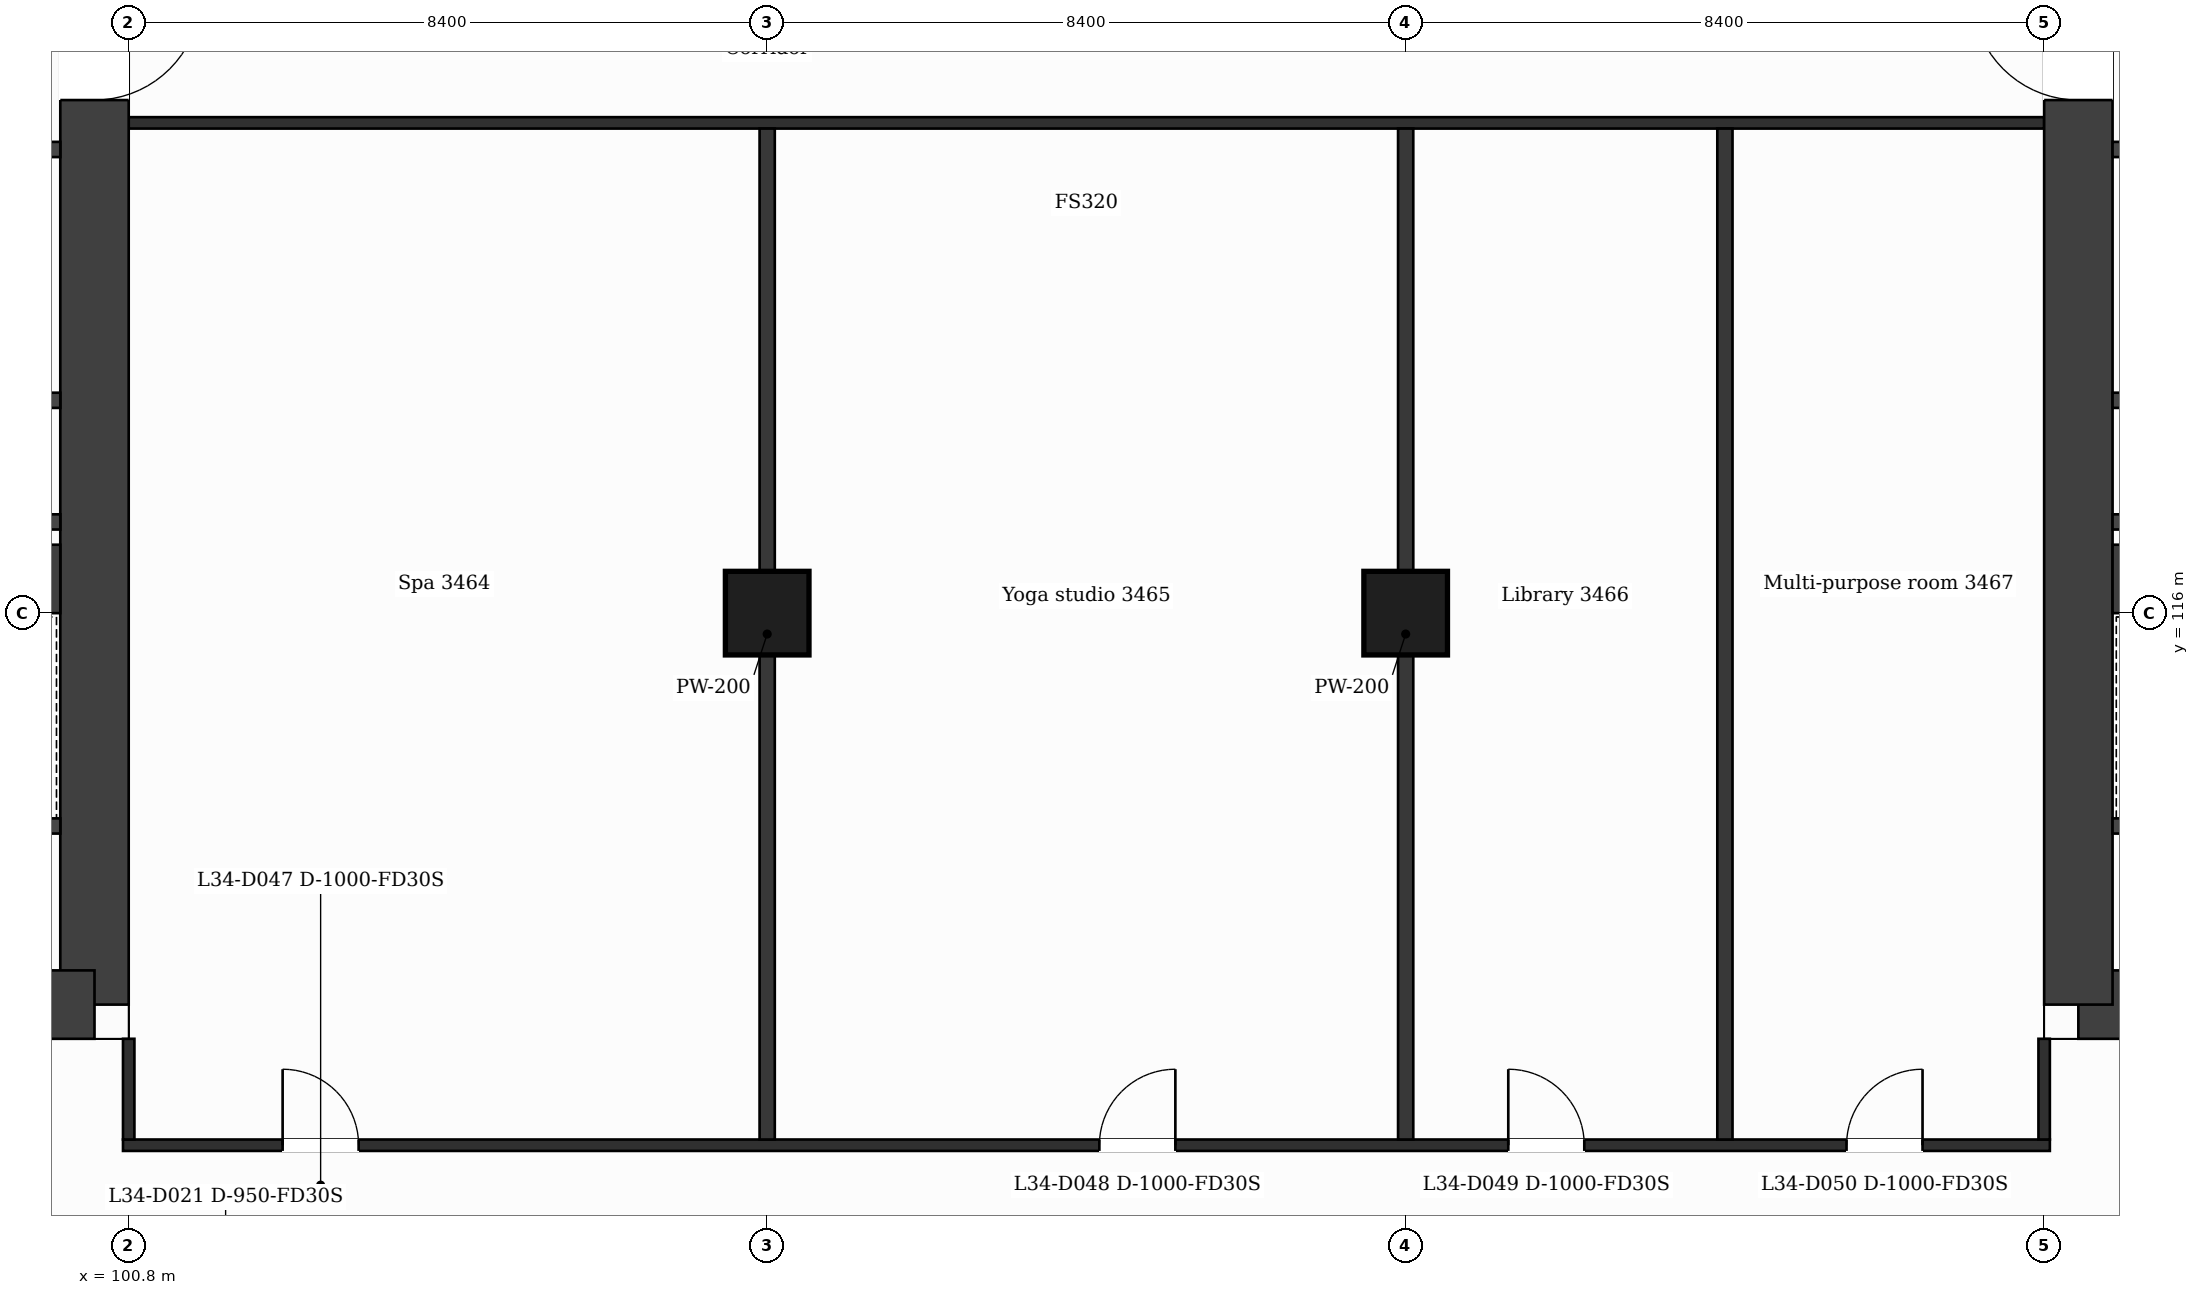
"""IFC4 building model, lengths in metres.
Left out: names, types, materials, properties, quantities, classifications, styles, units other than length and angle.
Written with IfcOpenShell. Run it as: python <this file> out.ifc"""

import sys

from ifc_helpers import new_model, si_unit, direction, frame, frame_2d, origin, origin_2d, place, context, subcontext, project, spatial, rectangle, extrude, element, fill, save


model = new_model("IFC4")
c1 = context("Model", 3, precision=1e-05, world=origin(), true_north=direction((0.0, 1.0)))
c2 = subcontext(c1, "Body", "Model", "MODEL_VIEW")
j1 = project(units=[si_unit("LENGTHUNIT", "METRE"), si_unit("PLANEANGLEUNIT", "RADIAN")], contexts=[c1])
p1 = place(None, origin())
s1 = spatial("IfcSite", under=j1, at=p1, CompositionType="ELEMENT")
p2 = place(p1, origin())
s2 = spatial("IfcBuilding", under=s1, at=p2, CompositionType="ELEMENT")
p3 = place(p2, frame((0.0, 0.0, 147.8)))
s3 = spatial("IfcBuildingStorey", under=s2, at=p3, CompositionType="ELEMENT", Elevation=147.8)
p4 = place(p3, frame((100.35, 131.95, 0.0), z_axis=(0.0, 0.0, 1.0), x_axis=(0.0, -1.0, 0.0)))
e1 = element("IfcWall", 1, at=p4, inside=s3, PredefinedType="SHEAR", context=c2, shape_type="SweptSolid", body=[
    extrude(rectangle(XDim=21.1, YDim=0.9, at=frame_2d((10.55, 0.0))), origin(), (0.0, 0.0, 1.0), 3.7),
])
p5 = place(p4, frame((7.8, 0.0, 0.0)))
e2 = element("IfcOpeningElement", 2, at=p5, cuts=e1, PredefinedType="OPENING", context=c2, shape_type="SweptSolid", body=[
    extrude(rectangle(XDim=1.4, YDim=2.1, at=frame_2d((0.7, 1.05))), frame((0.0, 0.46, 0.0), z_axis=(0.0, -1.0, 0.0), x_axis=(1.0, 0.0, 0.0)), (0.0, 0.0, 1.0), 0.92),
])
p6 = place(p3, frame((100.35, 110.85, 0.0), z_axis=(0.0, 0.0, 1.0), x_axis=(-1.0, 0.0, 0.0)))
e3 = element("IfcWall", 3, at=p6, inside=s3, PredefinedType="SHEAR", context=c2, shape_type="SweptSolid", body=[
    extrude(rectangle(XDim=14.166, YDim=0.9, at=frame_2d((7.083, 0.0))), origin(), (0.0, 0.0, 1.0), 3.7),
])
p7 = place(p6, frame((5.855, 0.0, 0.0)))
e4 = element("IfcOpeningElement", 4, at=p7, cuts=e3, PredefinedType="OPENING", context=c2, shape_type="SweptSolid", body=[
    extrude(rectangle(XDim=1.4, YDim=2.1, at=frame_2d((0.7, 1.05))), frame((0.0, 0.46, 0.0), z_axis=(0.0, -1.0, 0.0), x_axis=(1.0, 0.0, 0.0)), (0.0, 0.0, 1.0), 0.92),
])
p8 = place(p3, frame((94.8, 116.45, 0.0), z_axis=(0.0, 0.0, 1.0), x_axis=(1.0, 0.0, 0.0)))
e5 = element("IfcWall", 5, at=p8, inside=s3, PredefinedType="SHEAR", context=c2, shape_type="SweptSolid", body=[
    extrude(rectangle(XDim=5.1, YDim=0.9, at=frame_2d((2.55, 0.0))), origin(), (0.0, 0.0, 1.0), 3.7),
])
p9 = place(p3, frame((140.616, 110.85, 0.0), z_axis=(0.0, 0.0, 1.0), x_axis=(-1.0, 0.0, 0.0)))
e6 = element("IfcWall", 6, at=p9, inside=s3, PredefinedType="SHEAR", context=c2, shape_type="SweptSolid", body=[
    extrude(rectangle(XDim=14.166, YDim=0.9, at=frame_2d((7.083, 0.0))), origin(), (0.0, 0.0, 1.0), 3.7),
])
p10 = place(p9, frame((6.911, 0.0, 0.0)))
e7 = element("IfcOpeningElement", 7, at=p10, cuts=e6, PredefinedType="OPENING", context=c2, shape_type="SweptSolid", body=[
    extrude(rectangle(XDim=1.4, YDim=2.1, at=frame_2d((0.7, 1.05))), frame((0.0, 0.46, 0.0), z_axis=(0.0, -1.0, 0.0), x_axis=(1.0, 0.0, 0.0)), (0.0, 0.0, 1.0), 0.92),
])
p11 = place(p3, frame((126.45, 110.85, 0.0), z_axis=(0.0, 0.0, 1.0), x_axis=(0.0, 1.0, 0.0)))
e8 = element("IfcWall", 8, at=p11, inside=s3, PredefinedType="SHEAR", context=c2, shape_type="SweptSolid", body=[
    extrude(rectangle(XDim=21.1, YDim=0.9, at=frame_2d((10.55, 0.0))), origin(), (0.0, 0.0, 1.0), 3.7),
])
p12 = place(p11, frame((11.9, 0.0, 0.0)))
e9 = element("IfcOpeningElement", 9, at=p12, cuts=e8, PredefinedType="OPENING", context=c2, shape_type="SweptSolid", body=[
    extrude(rectangle(XDim=1.4, YDim=2.1, at=frame_2d((0.7, 1.05))), frame((0.0, 0.46, 0.0), z_axis=(0.0, -1.0, 0.0), x_axis=(1.0, 0.0, 0.0)), (0.0, 0.0, 1.0), 0.92),
])
p13 = place(p3, frame((126.9, 116.45, 0.0), z_axis=(0.0, 0.0, 1.0), x_axis=(1.0, 0.0, 0.0)))
e10 = element("IfcWall", 10, at=p13, inside=s3, PredefinedType="SHEAR", context=c2, shape_type="SweptSolid", body=[
    extrude(rectangle(XDim=5.1, YDim=0.9, at=frame_2d((2.55, 0.0))), origin(), (0.0, 0.0, 1.0), 3.7),
])
for number, where, z_axis, x_axis in (
    (11, (109.2, 116.0, 0.0), (0.0, 0.0, 1.0), (1.0, 0.0, 0.0)),
    (12, (117.6, 116.0, 0.0), (0.0, 0.0, 1.0), (1.0, 0.0, 0.0)),
):
    element("IfcColumn", number, at=place(p3, frame(where, z_axis=z_axis, x_axis=x_axis)), inside=s3, PredefinedType="COLUMN", context=c2, shape_type="SweptSolid", body=[
        extrude(rectangle(XDim=1.1, YDim=1.1, at=origin_2d()), origin(), (0.0, 0.0, 1.0), 3.7),
    ])
p14 = place(p3, frame((100.725, 109.0, 0.0), z_axis=(0.0, 0.0, 1.0), x_axis=(1.0, 0.0, 0.0)))
e13 = element("IfcWall", 13, at=p14, inside=s3, PredefinedType="PARTITIONING", context=c2, shape_type="SweptSolid", body=[
    extrude(rectangle(XDim=25.35, YDim=0.15, at=frame_2d((12.675, 0.0))), origin(), (0.0, 0.0, 1.0), 3.38),
])
p15 = place(p14, frame((2.1, 0.0, 0.0)))
e14 = element("IfcOpeningElement", 14, at=p15, cuts=e13, PredefinedType="OPENING", context=c2, shape_type="SweptSolid", body=[
    extrude(rectangle(XDim=1.0, YDim=2.1, at=frame_2d((0.5, 1.05))), frame((0.0, 0.085, 0.0), z_axis=(0.0, -1.0, 0.0), x_axis=(1.0, 0.0, 0.0)), (0.0, 0.0, 1.0), 0.17),
])
p16 = place(p14, frame((12.845, 0.0, 0.0)))
e15 = element("IfcOpeningElement", 15, at=p16, cuts=e13, PredefinedType="OPENING", context=c2, shape_type="SweptSolid", body=[
    extrude(rectangle(XDim=1.0, YDim=2.1, at=frame_2d((0.5, 1.05))), frame((0.0, 0.085, 0.0), z_axis=(0.0, -1.0, 0.0), x_axis=(1.0, 0.0, 0.0)), (0.0, 0.0, 1.0), 0.17),
])
p17 = place(p14, frame((18.225, 0.0, 0.0)))
e16 = element("IfcOpeningElement", 16, at=p17, cuts=e13, PredefinedType="OPENING", context=c2, shape_type="SweptSolid", body=[
    extrude(rectangle(XDim=1.0, YDim=2.1, at=frame_2d((0.5, 1.05))), frame((0.0, 0.085, 0.0), z_axis=(0.0, -1.0, 0.0), x_axis=(1.0, 0.0, 0.0)), (0.0, 0.0, 1.0), 0.17),
])
p18 = place(p14, frame((22.675, 0.0, 0.0)))
e17 = element("IfcOpeningElement", 17, at=p18, cuts=e13, PredefinedType="OPENING", context=c2, shape_type="SweptSolid", body=[
    extrude(rectangle(XDim=1.0, YDim=2.1, at=frame_2d((0.5, 1.05))), frame((0.0, 0.085, 0.0), z_axis=(0.0, -1.0, 0.0), x_axis=(1.0, 0.0, 0.0)), (0.0, 0.0, 1.0), 0.17),
])
p19 = place(p3, frame((95.127, 113.2, 0.0), z_axis=(0.0, 0.0, 1.0), x_axis=(1.0, 0.0, 0.0)))
e18 = element("IfcWall", 18, at=p19, inside=s3, PredefinedType="PARTITIONING", context=c2, shape_type="SweptSolid", body=[
    extrude(rectangle(XDim=4.773, YDim=0.2, at=frame_2d((2.386, 0.0))), origin(), (0.0, 0.0, 1.0), 3.38),
])
p20 = place(p19, frame((2.921, 0.0, 0.0)))
e19 = element("IfcOpeningElement", 19, at=p20, cuts=e18, PredefinedType="OPENING", context=c2, shape_type="SweptSolid", body=[
    extrude(rectangle(XDim=1.1, YDim=2.1, at=frame_2d((0.55, 1.05))), frame((0.0, 0.11, 0.0), z_axis=(0.0, -1.0, 0.0), x_axis=(1.0, 0.0, 0.0)), (0.0, 0.0, 1.0), 0.22),
])
p21 = place(p3, frame((126.9, 113.2, 0.0), z_axis=(0.0, 0.0, 1.0), x_axis=(1.0, 0.0, 0.0)))
e20 = element("IfcWall", 20, at=p21, inside=s3, PredefinedType="PARTITIONING", context=c2, shape_type="SweptSolid", body=[
    extrude(rectangle(XDim=4.773, YDim=0.2, at=frame_2d((2.387, 0.0))), origin(), (0.0, 0.0, 1.0), 3.38),
])
p22 = place(p21, frame((0.618, 0.0, 0.0)))
e21 = element("IfcOpeningElement", 21, at=p22, cuts=e20, PredefinedType="OPENING", context=c2, shape_type="SweptSolid", body=[
    extrude(rectangle(XDim=1.1, YDim=2.1, at=frame_2d((0.55, 1.05))), frame((0.0, 0.11, 0.0), z_axis=(0.0, -1.0, 0.0), x_axis=(1.0, 0.0, 0.0)), (0.0, 0.0, 1.0), 0.22),
])
p23 = place(p3, frame((95.227, 117.2, 0.0), z_axis=(0.0, 0.0, 1.0), x_axis=(1.0, 0.0, 0.0)))
e22 = element("IfcWall", 22, at=p23, inside=s3, PredefinedType="PARTITIONING", context=c2, shape_type="SweptSolid", body=[
    extrude(rectangle(XDim=4.673, YDim=0.2, at=frame_2d((2.336, 0.0))), origin(), (0.0, 0.0, 1.0), 3.38),
])
p24 = place(p3, frame((126.9, 117.2, 0.0), z_axis=(0.0, 0.0, 1.0), x_axis=(1.0, 0.0, 0.0)))
e23 = element("IfcWall", 23, at=p24, inside=s3, PredefinedType="PARTITIONING", context=c2, shape_type="SweptSolid", body=[
    extrude(rectangle(XDim=4.673, YDim=0.2, at=frame_2d((2.336, 0.0))), origin(), (0.0, 0.0, 1.0), 3.38),
])
p25 = place(p3, frame((95.227, 118.8, 0.0), z_axis=(0.0, 0.0, 1.0), x_axis=(1.0, 0.0, 0.0)))
e24 = element("IfcWall", 24, at=p25, inside=s3, PredefinedType="PARTITIONING", context=c2, shape_type="SweptSolid", body=[
    extrude(rectangle(XDim=4.673, YDim=0.2, at=frame_2d((2.336, 0.0))), origin(), (0.0, 0.0, 1.0), 3.38),
])
p26 = place(p3, frame((126.9, 118.8, 0.0), z_axis=(0.0, 0.0, 1.0), x_axis=(1.0, 0.0, 0.0)))
e25 = element("IfcWall", 25, at=p26, inside=s3, PredefinedType="PARTITIONING", context=c2, shape_type="SweptSolid", body=[
    extrude(rectangle(XDim=4.673, YDim=0.2, at=frame_2d((2.336, 0.0))), origin(), (0.0, 0.0, 1.0), 3.38),
])
p27 = place(p3, frame((95.227, 122.1, 0.0), z_axis=(0.0, 0.0, 1.0), x_axis=(1.0, 0.0, 0.0)))
e26 = element("IfcWall", 26, at=p27, inside=s3, PredefinedType="PARTITIONING", context=c2, shape_type="SweptSolid", body=[
    extrude(rectangle(XDim=4.673, YDim=0.2, at=frame_2d((2.336, 0.0))), origin(), (0.0, 0.0, 1.0), 3.38),
])
p28 = place(p27, frame((0.718, 0.0, 0.0)))
e27 = element("IfcOpeningElement", 27, at=p28, cuts=e26, PredefinedType="OPENING", context=c2, shape_type="SweptSolid", body=[
    extrude(rectangle(XDim=0.9, YDim=2.1, at=frame_2d((0.45, 1.05))), frame((0.0, 0.11, 0.0), z_axis=(0.0, -1.0, 0.0), x_axis=(1.0, 0.0, 0.0)), (0.0, 0.0, 1.0), 0.22),
])
p29 = place(p27, frame((3.055, 0.0, 0.0)))
e28 = element("IfcOpeningElement", 28, at=p29, cuts=e26, PredefinedType="OPENING", context=c2, shape_type="SweptSolid", body=[
    extrude(rectangle(XDim=0.9, YDim=2.1, at=frame_2d((0.45, 1.05))), frame((0.0, 0.11, 0.0), z_axis=(0.0, -1.0, 0.0), x_axis=(1.0, 0.0, 0.0)), (0.0, 0.0, 1.0), 0.22),
])
p30 = place(p3, frame((126.9, 122.1, 0.0), z_axis=(0.0, 0.0, 1.0), x_axis=(1.0, 0.0, 0.0)))
e29 = element("IfcWall", 29, at=p30, inside=s3, PredefinedType="PARTITIONING", context=c2, shape_type="SweptSolid", body=[
    extrude(rectangle(XDim=4.673, YDim=0.2, at=frame_2d((2.336, 0.0))), origin(), (0.0, 0.0, 1.0), 3.38),
])
p31 = place(p30, frame((3.128, 0.0, 0.0)))
e30 = element("IfcOpeningElement", 30, at=p31, cuts=e29, PredefinedType="OPENING", context=c2, shape_type="SweptSolid", body=[
    extrude(rectangle(XDim=0.9, YDim=2.1, at=frame_2d((0.45, 1.05))), frame((0.0, 0.11, 0.0), z_axis=(0.0, -1.0, 0.0), x_axis=(1.0, 0.0, 0.0)), (0.0, 0.0, 1.0), 0.22),
])
p32 = place(p30, frame((0.902, 0.0, 0.0)))
e31 = element("IfcOpeningElement", 31, at=p32, cuts=e29, PredefinedType="OPENING", context=c2, shape_type="SweptSolid", body=[
    extrude(rectangle(XDim=0.9, YDim=2.1, at=frame_2d((0.45, 1.05))), frame((0.0, 0.11, 0.0), z_axis=(0.0, -1.0, 0.0), x_axis=(1.0, 0.0, 0.0)), (0.0, 0.0, 1.0), 0.22),
])
p33 = place(p3, frame((100.8, 122.45, 0.0), z_axis=(0.0, 0.0, 1.0), x_axis=(1.0, 0.0, 0.0)))
e32 = element("IfcWall", 32, at=p33, inside=s3, PredefinedType="PARTITIONING", context=c2, shape_type="SweptSolid", body=[
    extrude(rectangle(XDim=25.2, YDim=0.15, at=frame_2d((12.6, 0.0))), origin(), (0.0, 0.0, 1.0), 3.38),
])
p34 = place(p3, frame((100.8, 109.075, 0.0), z_axis=(0.0, 0.0, 1.0), x_axis=(0.0, 1.0, 0.0)))
e33 = element("IfcWall", 33, at=p34, inside=s3, PredefinedType="PARTITIONING", context=c2, shape_type="SweptSolid", body=[
    extrude(rectangle(XDim=1.325, YDim=0.15, at=frame_2d((0.663, 0.0))), origin(), (0.0, 0.0, 1.0), 3.38),
])
for number, where, z_axis, x_axis in (
    (34, (109.2, 109.075, 0.0), (0.0, 0.0, 1.0), (0.0, 1.0, 0.0)),
    (35, (117.6, 109.075, 0.0), (0.0, 0.0, 1.0), (0.0, 1.0, 0.0)),
    (36, (121.8, 109.075, 0.0), (0.0, 0.0, 1.0), (0.0, 1.0, 0.0)),
):
    element("IfcWall", number, at=place(p3, frame(where, z_axis=z_axis, x_axis=x_axis)), inside=s3, PredefinedType="PARTITIONING", context=c2, shape_type="SweptSolid", body=[
        extrude(rectangle(XDim=13.3, YDim=0.2, at=frame_2d((6.65, 0.0))), origin(), (0.0, 0.0, 1.0), 3.38),
    ])
p35 = place(p3, frame((126.0, 109.075, 0.0), z_axis=(0.0, 0.0, 1.0), x_axis=(0.0, 1.0, 0.0)))
e37 = element("IfcWall", 37, at=p35, inside=s3, PredefinedType="PARTITIONING", context=c2, shape_type="SweptSolid", body=[
    extrude(rectangle(XDim=1.325, YDim=0.15, at=frame_2d((0.663, 0.0))), origin(), (0.0, 0.0, 1.0), 3.38),
])
p36 = place(p15, origin())
e38 = element("IfcDoor", 38, at=p36, inside=s3, OperationType="SINGLE_SWING_LEFT", PredefinedType="DOOR", context=c2, shape_type="SweptSolid", body=[
    extrude(rectangle(XDim=1.0, YDim=2.1, at=frame_2d((0.5, 1.05))), frame((0.0, 0.025, 0.0), z_axis=(0.0, -1.0, 0.0), x_axis=(1.0, 0.0, 0.0)), (0.0, 0.0, 1.0), 0.05),
])
fill(e14, e38)
p37 = place(p16, origin())
e39 = element("IfcDoor", 39, at=p37, inside=s3, OperationType="SINGLE_SWING_RIGHT", PredefinedType="DOOR", context=c2, shape_type="SweptSolid", body=[
    extrude(rectangle(XDim=1.0, YDim=2.1, at=frame_2d((0.5, 1.05))), frame((0.0, 0.025, 0.0), z_axis=(0.0, -1.0, 0.0), x_axis=(1.0, 0.0, 0.0)), (0.0, 0.0, 1.0), 0.05),
])
fill(e15, e39)
p38 = place(p17, origin())
e40 = element("IfcDoor", 40, at=p38, inside=s3, OperationType="SINGLE_SWING_LEFT", PredefinedType="DOOR", context=c2, shape_type="SweptSolid", body=[
    extrude(rectangle(XDim=1.0, YDim=2.1, at=frame_2d((0.5, 1.05))), frame((0.0, 0.025, 0.0), z_axis=(0.0, -1.0, 0.0), x_axis=(1.0, 0.0, 0.0)), (0.0, 0.0, 1.0), 0.05),
])
fill(e16, e40)
p39 = place(p18, origin())
e41 = element("IfcDoor", 41, at=p39, inside=s3, OperationType="SINGLE_SWING_RIGHT", PredefinedType="DOOR", context=c2, shape_type="SweptSolid", body=[
    extrude(rectangle(XDim=1.0, YDim=2.1, at=frame_2d((0.5, 1.05))), frame((0.0, 0.025, 0.0), z_axis=(0.0, -1.0, 0.0), x_axis=(1.0, 0.0, 0.0)), (0.0, 0.0, 1.0), 0.05),
])
fill(e17, e41)
p40 = place(p5, origin())
e42 = element("IfcDoor", 42, at=p40, inside=s3, OperationType="SINGLE_SWING_LEFT", PredefinedType="DOOR", context=c2, shape_type="SweptSolid", body=[
    extrude(rectangle(XDim=1.4, YDim=2.1, at=frame_2d((0.7, 1.05))), frame((0.0, 0.025, 0.0), z_axis=(0.0, -1.0, 0.0), x_axis=(1.0, 0.0, 0.0)), (0.0, 0.0, 1.0), 0.05),
])
fill(e2, e42)
p41 = place(p12, origin())
e43 = element("IfcDoor", 43, at=p41, inside=s3, OperationType="SINGLE_SWING_RIGHT", PredefinedType="DOOR", context=c2, shape_type="SweptSolid", body=[
    extrude(rectangle(XDim=1.4, YDim=2.1, at=frame_2d((0.7, 1.05))), frame((0.0, 0.025, 0.0), z_axis=(0.0, -1.0, 0.0), x_axis=(1.0, 0.0, 0.0)), (0.0, 0.0, 1.0), 0.05),
])
fill(e9, e43)
save(model, sys.argv[1])
